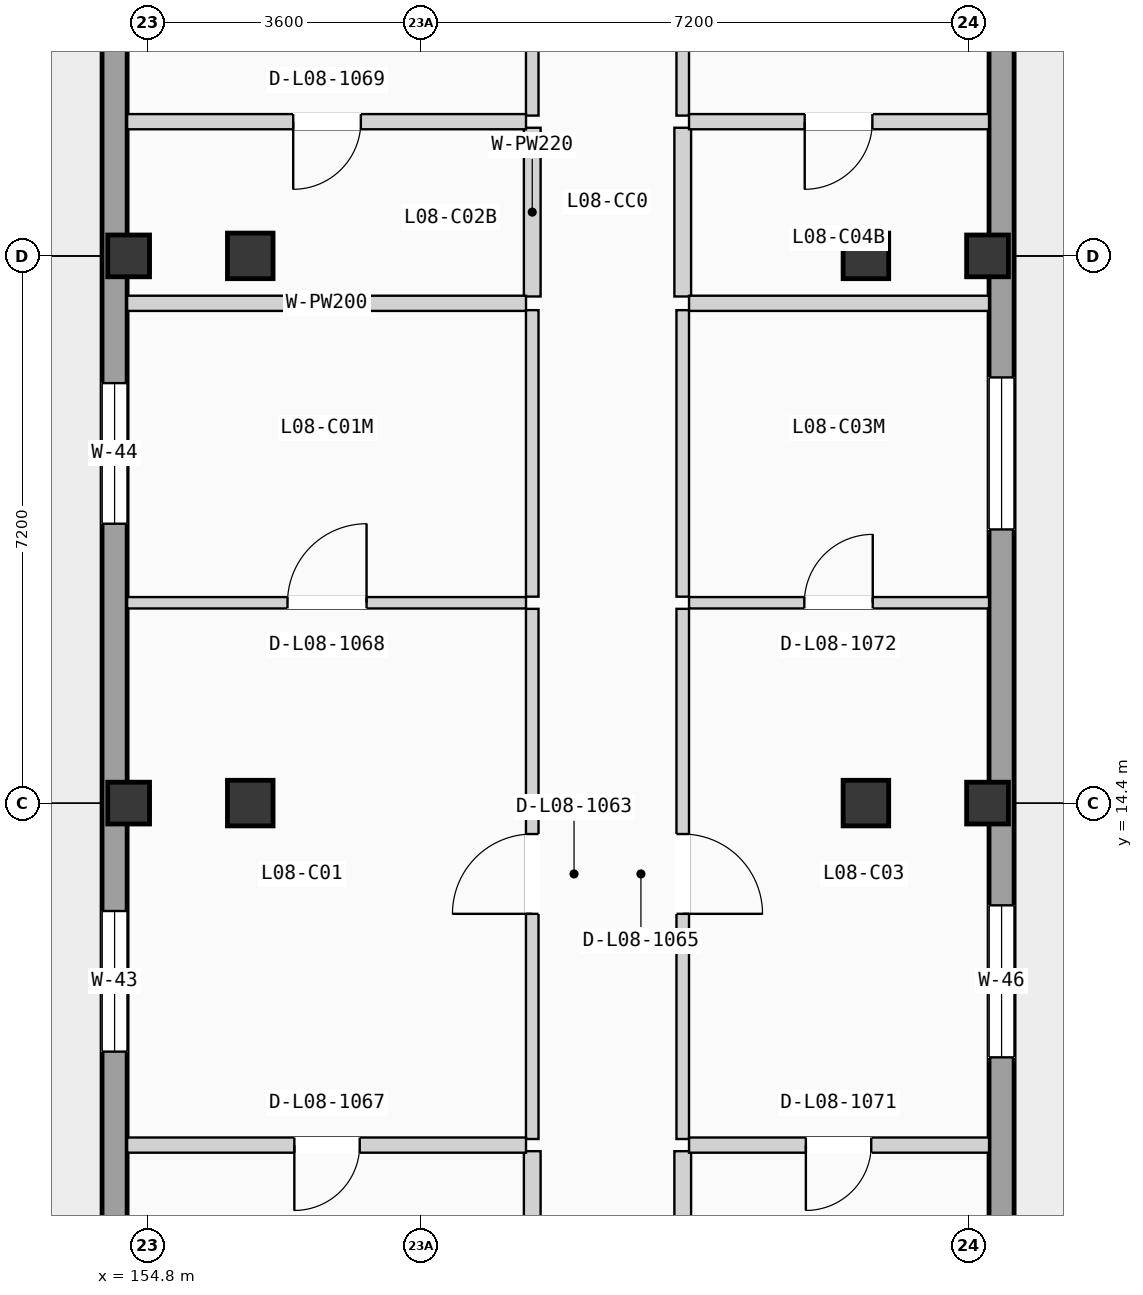
"""IFC4 building model, lengths in metres.
Left out: names, types, materials, properties, quantities, classifications, styles, units other than length and angle.
Written with IfcOpenShell. Run it as: python <this file> out.ifc"""

import sys

from ifc_helpers import new_model, si_unit, direction, frame, frame_2d, origin, origin_2d, place, context, subcontext, project, spatial, rectangle, extrude, element, fill, save


model = new_model("IFC4")
c1 = context("Model", 3, precision=1e-05, world=origin(), true_north=direction((0.0, 1.0)))
c2 = subcontext(c1, "Body", "Model", "MODEL_VIEW")
j1 = project(units=[si_unit("LENGTHUNIT", "METRE"), si_unit("PLANEANGLEUNIT", "RADIAN")], contexts=[c1])
p1 = place(None, origin())
s1 = spatial("IfcSite", under=j1, at=p1, CompositionType="ELEMENT")
p2 = place(p1, origin())
s2 = spatial("IfcBuilding", under=s1, at=p2, CompositionType="ELEMENT")
p3 = place(p2, frame((0.0, 0.0, 27.825)))
s3 = spatial("IfcBuildingStorey", under=s2, at=p3, CompositionType="ELEMENT", Elevation=27.825)
for number, where, z_axis, x_axis in (
    (1, (154.55, 14.4, 0.0), (0.0, 0.0, 1.0), (1.0, 0.0, 0.0)),
    (2, (154.55, 21.6, 0.0), (0.0, 0.0, 1.0), (1.0, 0.0, 0.0)),
):
    element("IfcColumn", number, at=place(p3, frame(where, z_axis=z_axis, x_axis=x_axis)), inside=s3, PredefinedType="COLUMN", context=c2, shape_type="SweptSolid", body=[
        extrude(rectangle(XDim=0.55, YDim=0.55, at=origin_2d()), origin(), (0.0, 0.0, 1.0), 3.15),
    ])
for number, where, z_axis, x_axis in (
    (3, (156.15, 14.4, 0.0), (0.0, 0.0, 1.0), (1.0, 0.0, 0.0)),
    (4, (156.15, 21.6, 0.0), (0.0, 0.0, 1.0), (1.0, 0.0, 0.0)),
    (5, (164.25, 14.4, 0.0), (0.0, 0.0, 1.0), (1.0, 0.0, 0.0)),
    (6, (164.25, 21.6, 0.0), (0.0, 0.0, 1.0), (1.0, 0.0, 0.0)),
):
    element("IfcColumn", number, at=place(p3, frame(where, z_axis=z_axis, x_axis=x_axis)), inside=s3, PredefinedType="COLUMN", context=c2, shape_type="SweptSolid", body=[
        extrude(rectangle(XDim=0.6, YDim=0.6, at=origin_2d()), origin(), (0.0, 0.0, 1.0), 3.15),
    ])
for number, where, z_axis, x_axis in (
    (7, (165.85, 14.4, 0.0), (0.0, 0.0, 1.0), (1.0, 0.0, 0.0)),
    (8, (165.85, 21.6, 0.0), (0.0, 0.0, 1.0), (1.0, 0.0, 0.0)),
):
    element("IfcColumn", number, at=place(p3, frame(where, z_axis=z_axis, x_axis=x_axis)), inside=s3, PredefinedType="COLUMN", context=c2, shape_type="SweptSolid", body=[
        extrude(rectangle(XDim=0.55, YDim=0.55, at=origin_2d()), origin(), (0.0, 0.0, 1.0), 3.15),
    ])
p4 = place(p3, frame((154.365, 0.33, 0.0), z_axis=(0.0, 0.0, 1.0), x_axis=(0.0, 1.0, 0.0)))
e9 = element("IfcWall", 9, at=p4, inside=s3, PredefinedType="SOLIDWALL", context=c2, shape_type="SweptSolid", body=[
    extrude(rectangle(XDim=49.74, YDim=0.33, at=frame_2d((24.87, 0.0))), origin(), (0.0, 0.0, 1.0), 2.89),
])
p5 = place(p4, frame((10.8, 0.0, 0.705)))
e10 = element("IfcOpeningElement", 10, at=p5, cuts=e9, PredefinedType="OPENING", context=c2, shape_type="SweptSolid", body=[
    extrude(rectangle(XDim=1.85, YDim=1.5, at=frame_2d((0.925, 0.75))), frame((0.0, 0.175, 0.0), z_axis=(0.0, -1.0, 0.0), x_axis=(1.0, 0.0, 0.0)), (0.0, 0.0, 1.0), 0.35),
])
p6 = place(p4, frame((17.746, 0.0, 0.555)))
e11 = element("IfcOpeningElement", 11, at=p6, cuts=e9, PredefinedType="OPENING", context=c2, shape_type="SweptSolid", body=[
    extrude(rectangle(XDim=1.85, YDim=1.65, at=frame_2d((0.925, 0.825))), frame((0.0, 0.175, 0.0), z_axis=(0.0, -1.0, 0.0), x_axis=(1.0, 0.0, 0.0)), (0.0, 0.0, 1.0), 0.35),
])
p7 = place(p4, frame((31.595, 0.0, 0.85)))
e12 = element("IfcOpeningElement", 12, at=p7, cuts=e9, PredefinedType="OPENING", context=c2, shape_type="SweptSolid", body=[
    extrude(rectangle(XDim=0.95, YDim=1.2, at=frame_2d((0.475, 0.6))), frame((0.0, 0.175, 0.0), z_axis=(0.0, -1.0, 0.0), x_axis=(1.0, 0.0, 0.0)), (0.0, 0.0, 1.0), 0.35),
])
p8 = place(p3, frame((166.035, 0.33, 0.0), z_axis=(0.0, 0.0, 1.0), x_axis=(0.0, 1.0, 0.0)))
e13 = element("IfcWall", 13, at=p8, inside=s3, PredefinedType="SOLIDWALL", context=c2, shape_type="SweptSolid", body=[
    extrude(rectangle(XDim=49.74, YDim=0.33, at=frame_2d((24.87, 0.0))), origin(), (0.0, 0.0, 1.0), 2.89),
])
p9 = place(p8, frame((10.725, 0.0, 0.9)))
e14 = element("IfcOpeningElement", 14, at=p9, cuts=e13, PredefinedType="OPENING", context=c2, shape_type="SweptSolid", body=[
    extrude(rectangle(XDim=2.0, YDim=1.2, at=frame_2d((1.0, 0.6))), frame((0.0, 0.175, 0.0), z_axis=(0.0, -1.0, 0.0), x_axis=(1.0, 0.0, 0.0)), (0.0, 0.0, 1.0), 0.35),
])
p10 = place(p8, frame((17.671, 0.0, 0.855)))
e15 = element("IfcOpeningElement", 15, at=p10, cuts=e13, PredefinedType="OPENING", context=c2, shape_type="SweptSolid", body=[
    extrude(rectangle(XDim=2.0, YDim=1.35, at=frame_2d((1.0, 0.675))), frame((0.0, 0.175, 0.0), z_axis=(0.0, -1.0, 0.0), x_axis=(1.0, 0.0, 0.0)), (0.0, 0.0, 1.0), 0.35),
])
p11 = place(p8, frame((31.07, 0.0, 0.705)))
e16 = element("IfcOpeningElement", 16, at=p11, cuts=e13, PredefinedType="OPENING", context=c2, shape_type="SweptSolid", body=[
    extrude(rectangle(XDim=2.0, YDim=1.5, at=frame_2d((1.0, 0.75))), frame((0.0, 0.175, 0.0), z_axis=(0.0, -1.0, 0.0), x_axis=(1.0, 0.0, 0.0)), (0.0, 0.0, 1.0), 0.35),
])
p12 = place(p3, frame((159.86, 7.6, 0.0), z_axis=(0.0, 0.0, 1.0), x_axis=(0.0, 1.0, 0.0)))
e17 = element("IfcWall", 17, at=p12, inside=s3, PredefinedType="PLUMBINGWALL", context=c2, shape_type="SweptSolid", body=[
    extrude(rectangle(XDim=2.22, YDim=0.22, at=frame_2d((1.11, 0.0))), origin(), (0.0, 0.0, 1.0), 2.87),
])
p13 = place(p3, frame((159.86, 9.98, 0.0), z_axis=(0.0, 0.0, 1.0), x_axis=(0.0, 1.0, 0.0)))
e18 = element("IfcWall", 18, at=p13, inside=s3, PredefinedType="PARTITIONING", context=c2, shape_type="SweptSolid", body=[
    extrude(rectangle(XDim=6.976, YDim=0.165, at=frame_2d((3.488, 0.0))), origin(), (0.0, 0.0, 1.0), 2.87),
])
p14 = place(p13, frame((2.963, 0.0, 0.0)))
e19 = element("IfcOpeningElement", 19, at=p14, cuts=e18, PredefinedType="OPENING", context=c2, shape_type="SweptSolid", body=[
    extrude(rectangle(XDim=1.05, YDim=2.13, at=frame_2d((0.525, 1.065))), frame((0.0, 0.093, 0.0), z_axis=(0.0, -1.0, 0.0), x_axis=(1.0, 0.0, 0.0)), (0.0, 0.0, 1.0), 0.185),
])
p15 = place(p3, frame((159.86, 17.116, 0.0), z_axis=(0.0, 0.0, 1.0), x_axis=(0.0, 1.0, 0.0)))
e20 = element("IfcWall", 20, at=p15, inside=s3, PredefinedType="PARTITIONING", context=c2, shape_type="SweptSolid", body=[
    extrude(rectangle(XDim=3.77, YDim=0.165, at=frame_2d((1.885, 0.0))), origin(), (0.0, 0.0, 1.0), 2.87),
])
p16 = place(p3, frame((159.86, 21.066, 0.0), z_axis=(0.0, 0.0, 1.0), x_axis=(0.0, 1.0, 0.0)))
e21 = element("IfcWall", 21, at=p16, inside=s3, PredefinedType="PLUMBINGWALL", context=c2, shape_type="SweptSolid", body=[
    extrude(rectangle(XDim=2.22, YDim=0.22, at=frame_2d((1.11, 0.0))), origin(), (0.0, 0.0, 1.0), 2.87),
])
p17 = place(p3, frame((159.86, 23.446, 0.0), z_axis=(0.0, 0.0, 1.0), x_axis=(0.0, 1.0, 0.0)))
e22 = element("IfcWall", 22, at=p17, inside=s3, PredefinedType="PARTITIONING", context=c2, shape_type="SweptSolid", body=[
    extrude(rectangle(XDim=15.424, YDim=0.165, at=frame_2d((7.712, 0.0))), origin(), (0.0, 0.0, 1.0), 2.87),
])
p18 = place(p17, frame((7.187, 0.0, 0.0)))
e23 = element("IfcOpeningElement", 23, at=p18, cuts=e22, PredefinedType="OPENING", context=c2, shape_type="SweptSolid", body=[
    extrude(rectangle(XDim=1.05, YDim=2.13, at=frame_2d((0.525, 1.065))), frame((0.0, 0.093, 0.0), z_axis=(0.0, -1.0, 0.0), x_axis=(1.0, 0.0, 0.0)), (0.0, 0.0, 1.0), 0.185),
])
p19 = place(p3, frame((161.84, 7.575, 0.0), z_axis=(0.0, 0.0, 1.0), x_axis=(0.0, 1.0, 0.0)))
e24 = element("IfcWall", 24, at=p19, inside=s3, PredefinedType="PLUMBINGWALL", context=c2, shape_type="SweptSolid", body=[
    extrude(rectangle(XDim=2.245, YDim=0.22, at=frame_2d((1.123, 0.0))), origin(), (0.0, 0.0, 1.0), 2.87),
])
p20 = place(p3, frame((161.84, 9.98, 0.0), z_axis=(0.0, 0.0, 1.0), x_axis=(0.0, 1.0, 0.0)))
e25 = element("IfcWall", 25, at=p20, inside=s3, PredefinedType="PARTITIONING", context=c2, shape_type="SweptSolid", body=[
    extrude(rectangle(XDim=6.976, YDim=0.165, at=frame_2d((3.488, 0.0))), origin(), (0.0, 0.0, 1.0), 2.87),
])
p21 = place(p20, frame((2.963, 0.0, 0.0)))
e26 = element("IfcOpeningElement", 26, at=p21, cuts=e25, PredefinedType="OPENING", context=c2, shape_type="SweptSolid", body=[
    extrude(rectangle(XDim=1.05, YDim=2.13, at=frame_2d((0.525, 1.065))), frame((0.0, 0.093, 0.0), z_axis=(0.0, -1.0, 0.0), x_axis=(1.0, 0.0, 0.0)), (0.0, 0.0, 1.0), 0.185),
])
p22 = place(p3, frame((161.84, 17.116, 0.0), z_axis=(0.0, 0.0, 1.0), x_axis=(0.0, 1.0, 0.0)))
e27 = element("IfcWall", 27, at=p22, inside=s3, PredefinedType="PARTITIONING", context=c2, shape_type="SweptSolid", body=[
    extrude(rectangle(XDim=3.77, YDim=0.165, at=frame_2d((1.885, 0.0))), origin(), (0.0, 0.0, 1.0), 2.87),
])
p23 = place(p3, frame((161.84, 21.066, 0.0), z_axis=(0.0, 0.0, 1.0), x_axis=(0.0, 1.0, 0.0)))
e28 = element("IfcWall", 28, at=p23, inside=s3, PredefinedType="PLUMBINGWALL", context=c2, shape_type="SweptSolid", body=[
    extrude(rectangle(XDim=2.22, YDim=0.22, at=frame_2d((1.11, 0.0))), origin(), (0.0, 0.0, 1.0), 2.87),
])
p24 = place(p3, frame((161.84, 23.446, 0.0), z_axis=(0.0, 0.0, 1.0), x_axis=(0.0, 1.0, 0.0)))
e29 = element("IfcWall", 29, at=p24, inside=s3, PredefinedType="PARTITIONING", context=c2, shape_type="SweptSolid", body=[
    extrude(rectangle(XDim=15.424, YDim=0.165, at=frame_2d((7.712, 0.0))), origin(), (0.0, 0.0, 1.0), 2.87),
])
p25 = place(p24, frame((7.187, 0.0, 0.0)))
e30 = element("IfcOpeningElement", 30, at=p25, cuts=e29, PredefinedType="OPENING", context=c2, shape_type="SweptSolid", body=[
    extrude(rectangle(XDim=1.05, YDim=2.13, at=frame_2d((0.525, 1.065))), frame((0.0, 0.093, 0.0), z_axis=(0.0, -1.0, 0.0), x_axis=(1.0, 0.0, 0.0)), (0.0, 0.0, 1.0), 0.185),
])
p26 = place(p3, frame((154.53, 9.9, 0.0), z_axis=(0.0, 0.0, 1.0), x_axis=(1.0, 0.0, 0.0)))
e31 = element("IfcWall", 31, at=p26, inside=s3, PredefinedType="PLUMBINGWALL", context=c2, shape_type="SweptSolid", body=[
    extrude(rectangle(XDim=5.248, YDim=0.2, at=frame_2d((2.624, 0.0))), origin(), (0.0, 0.0, 1.0), 2.87),
])
p27 = place(p26, frame((2.2, 0.0, 0.0)))
e32 = element("IfcOpeningElement", 32, at=p27, cuts=e31, PredefinedType="OPENING", context=c2, shape_type="SweptSolid", body=[
    extrude(rectangle(XDim=0.86, YDim=2.0, at=frame_2d((0.43, 1.0))), frame((0.0, 0.11, 0.0), z_axis=(0.0, -1.0, 0.0), x_axis=(1.0, 0.0, 0.0)), (0.0, 0.0, 1.0), 0.22),
])
p28 = place(p3, frame((154.53, 17.036, 0.0), z_axis=(0.0, 0.0, 1.0), x_axis=(1.0, 0.0, 0.0)))
e33 = element("IfcWall", 33, at=p28, inside=s3, PredefinedType="PARTITIONING", context=c2, shape_type="SweptSolid", body=[
    extrude(rectangle(XDim=5.248, YDim=0.15, at=frame_2d((2.624, 0.0))), origin(), (0.0, 0.0, 1.0), 2.87),
])
p29 = place(p28, frame((2.11, 0.0, 0.0)))
e34 = element("IfcOpeningElement", 34, at=p29, cuts=e33, PredefinedType="OPENING", context=c2, shape_type="SweptSolid", body=[
    extrude(rectangle(XDim=1.04, YDim=2.08, at=frame_2d((0.52, 1.04))), frame((0.0, 0.085, 0.0), z_axis=(0.0, -1.0, 0.0), x_axis=(1.0, 0.0, 0.0)), (0.0, 0.0, 1.0), 0.17),
])
p30 = place(p3, frame((154.53, 20.976, 0.0), z_axis=(0.0, 0.0, 1.0), x_axis=(1.0, 0.0, 0.0)))
e35 = element("IfcWall", 35, at=p30, inside=s3, PredefinedType="PLUMBINGWALL", context=c2, shape_type="SweptSolid", body=[
    extrude(rectangle(XDim=5.248, YDim=0.2, at=frame_2d((2.624, 0.0))), origin(), (0.0, 0.0, 1.0), 2.87),
])
p31 = place(p3, frame((154.53, 23.366, 0.0), z_axis=(0.0, 0.0, 1.0), x_axis=(1.0, 0.0, 0.0)))
e36 = element("IfcWall", 36, at=p31, inside=s3, PredefinedType="PLUMBINGWALL", context=c2, shape_type="SweptSolid", body=[
    extrude(rectangle(XDim=5.248, YDim=0.2, at=frame_2d((2.624, 0.0))), origin(), (0.0, 0.0, 1.0), 2.87),
])
p32 = place(p31, frame((2.185, 0.0, 0.0)))
e37 = element("IfcOpeningElement", 37, at=p32, cuts=e36, PredefinedType="OPENING", context=c2, shape_type="SweptSolid", body=[
    extrude(rectangle(XDim=0.89, YDim=2.03, at=frame_2d((0.445, 1.015))), frame((0.0, 0.11, 0.0), z_axis=(0.0, -1.0, 0.0), x_axis=(1.0, 0.0, 0.0)), (0.0, 0.0, 1.0), 0.22),
])
p33 = place(p3, frame((161.923, 9.9, 0.0), z_axis=(0.0, 0.0, 1.0), x_axis=(1.0, 0.0, 0.0)))
e38 = element("IfcWall", 38, at=p33, inside=s3, PredefinedType="PLUMBINGWALL", context=c2, shape_type="SweptSolid", body=[
    extrude(rectangle(XDim=3.947, YDim=0.2, at=frame_2d((1.974, 0.0))), origin(), (0.0, 0.0, 1.0), 2.87),
])
p34 = place(p33, frame((1.537, 0.0, 0.0)))
e39 = element("IfcOpeningElement", 39, at=p34, cuts=e38, PredefinedType="OPENING", context=c2, shape_type="SweptSolid", body=[
    extrude(rectangle(XDim=0.86, YDim=2.0, at=frame_2d((0.43, 1.0))), frame((0.0, 0.11, 0.0), z_axis=(0.0, -1.0, 0.0), x_axis=(1.0, 0.0, 0.0)), (0.0, 0.0, 1.0), 0.22),
])
p35 = place(p3, frame((161.923, 17.036, 0.0), z_axis=(0.0, 0.0, 1.0), x_axis=(1.0, 0.0, 0.0)))
e40 = element("IfcWall", 40, at=p35, inside=s3, PredefinedType="PARTITIONING", context=c2, shape_type="SweptSolid", body=[
    extrude(rectangle(XDim=3.947, YDim=0.15, at=frame_2d((1.974, 0.0))), origin(), (0.0, 0.0, 1.0), 2.87),
])
p36 = place(p35, frame((1.517, 0.0, 0.0)))
e41 = element("IfcOpeningElement", 41, at=p36, cuts=e40, PredefinedType="OPENING", context=c2, shape_type="SweptSolid", body=[
    extrude(rectangle(XDim=0.9, YDim=2.04, at=frame_2d((0.45, 1.02))), frame((0.0, 0.085, 0.0), z_axis=(0.0, -1.0, 0.0), x_axis=(1.0, 0.0, 0.0)), (0.0, 0.0, 1.0), 0.17),
])
p37 = place(p3, frame((161.923, 20.976, 0.0), z_axis=(0.0, 0.0, 1.0), x_axis=(1.0, 0.0, 0.0)))
e42 = element("IfcWall", 42, at=p37, inside=s3, PredefinedType="PLUMBINGWALL", context=c2, shape_type="SweptSolid", body=[
    extrude(rectangle(XDim=3.947, YDim=0.2, at=frame_2d((1.974, 0.0))), origin(), (0.0, 0.0, 1.0), 2.87),
])
p38 = place(p3, frame((161.923, 23.366, 0.0), z_axis=(0.0, 0.0, 1.0), x_axis=(1.0, 0.0, 0.0)))
e43 = element("IfcWall", 43, at=p38, inside=s3, PredefinedType="PLUMBINGWALL", context=c2, shape_type="SweptSolid", body=[
    extrude(rectangle(XDim=3.947, YDim=0.2, at=frame_2d((1.974, 0.0))), origin(), (0.0, 0.0, 1.0), 2.87),
])
p39 = place(p38, frame((1.522, 0.0, 0.0)))
e44 = element("IfcOpeningElement", 44, at=p39, cuts=e43, PredefinedType="OPENING", context=c2, shape_type="SweptSolid", body=[
    extrude(rectangle(XDim=0.89, YDim=2.03, at=frame_2d((0.445, 1.015))), frame((0.0, 0.11, 0.0), z_axis=(0.0, -1.0, 0.0), x_axis=(1.0, 0.0, 0.0)), (0.0, 0.0, 1.0), 0.22),
])
p40 = place(p5, origin())
e45 = element("IfcWindow", 45, at=p40, inside=s3, PartitioningType="DOUBLE_PANEL_VERTICAL", PredefinedType="WINDOW", context=c2, shape_type="SweptSolid", body=[
    extrude(rectangle(XDim=1.85, YDim=1.5, at=frame_2d((0.925, 0.75))), frame((0.0, 0.03, 0.0), z_axis=(0.0, -1.0, 0.0), x_axis=(1.0, 0.0, 0.0)), (0.0, 0.0, 1.0), 0.06),
])
fill(e10, e45)
p41 = place(p6, origin())
e46 = element("IfcWindow", 46, at=p41, inside=s3, PartitioningType="DOUBLE_PANEL_VERTICAL", PredefinedType="WINDOW", context=c2, shape_type="SweptSolid", body=[
    extrude(rectangle(XDim=1.85, YDim=1.65, at=frame_2d((0.925, 0.825))), frame((0.0, 0.03, 0.0), z_axis=(0.0, -1.0, 0.0), x_axis=(1.0, 0.0, 0.0)), (0.0, 0.0, 1.0), 0.06),
])
fill(e11, e46)
p42 = place(p9, origin())
e47 = element("IfcWindow", 47, at=p42, inside=s3, PartitioningType="DOUBLE_PANEL_VERTICAL", PredefinedType="WINDOW", context=c2, shape_type="SweptSolid", body=[
    extrude(rectangle(XDim=2.0, YDim=1.2, at=frame_2d((1.0, 0.6))), frame((0.0, 0.03, 0.0), z_axis=(0.0, -1.0, 0.0), x_axis=(1.0, 0.0, 0.0)), (0.0, 0.0, 1.0), 0.06),
])
fill(e14, e47)
p43 = place(p10, origin())
e48 = element("IfcWindow", 48, at=p43, inside=s3, PartitioningType="DOUBLE_PANEL_VERTICAL", PredefinedType="WINDOW", context=c2, shape_type="SweptSolid", body=[
    extrude(rectangle(XDim=2.0, YDim=1.35, at=frame_2d((1.0, 0.675))), frame((0.0, 0.03, 0.0), z_axis=(0.0, -1.0, 0.0), x_axis=(1.0, 0.0, 0.0)), (0.0, 0.0, 1.0), 0.06),
])
fill(e15, e48)
p44 = place(p14, origin())
e49 = element("IfcDoor", 49, at=p44, inside=s3, OperationType="SINGLE_SWING_LEFT", PredefinedType="DOOR", context=c2, shape_type="SweptSolid", body=[
    extrude(rectangle(XDim=1.05, YDim=2.13, at=frame_2d((0.525, 1.065))), frame((0.0, 0.025, 0.0), z_axis=(0.0, -1.0, 0.0), x_axis=(1.0, 0.0, 0.0)), (0.0, 0.0, 1.0), 0.05),
])
fill(e19, e49)
p45 = place(p21, frame((1.05, 0.0, 0.0), z_axis=(0.0, 0.0, 1.0), x_axis=(-1.0, 0.0, 0.0)))
e50 = element("IfcDoor", 50, at=p45, inside=s3, OperationType="SINGLE_SWING_LEFT", PredefinedType="DOOR", context=c2, shape_type="SweptSolid", body=[
    extrude(rectangle(XDim=1.05, YDim=2.13, at=frame_2d((0.525, 1.065))), frame((0.0, 0.025, 0.0), z_axis=(0.0, -1.0, 0.0), x_axis=(1.0, 0.0, 0.0)), (0.0, 0.0, 1.0), 0.05),
])
fill(e26, e50)
p46 = place(p27, frame((0.86, 0.0, 0.0), z_axis=(0.0, 0.0, 1.0), x_axis=(-1.0, 0.0, 0.0)))
e51 = element("IfcDoor", 51, at=p46, inside=s3, OperationType="SINGLE_SWING_LEFT", PredefinedType="DOOR", context=c2, shape_type="SweptSolid", body=[
    extrude(rectangle(XDim=0.86, YDim=2.0, at=frame_2d((0.43, 1.0))), frame((0.0, 0.025, 0.0), z_axis=(0.0, -1.0, 0.0), x_axis=(1.0, 0.0, 0.0)), (0.0, 0.0, 1.0), 0.05),
])
fill(e32, e51)
p47 = place(p29, origin())
e52 = element("IfcDoor", 52, at=p47, inside=s3, OperationType="SINGLE_SWING_RIGHT", PredefinedType="DOOR", context=c2, shape_type="SweptSolid", body=[
    extrude(rectangle(XDim=1.04, YDim=2.08, at=frame_2d((0.52, 1.04))), frame((0.0, 0.025, 0.0), z_axis=(0.0, -1.0, 0.0), x_axis=(1.0, 0.0, 0.0)), (0.0, 0.0, 1.0), 0.05),
])
fill(e34, e52)
p48 = place(p32, frame((0.89, 0.0, 0.0), z_axis=(0.0, 0.0, 1.0), x_axis=(-1.0, 0.0, 0.0)))
e53 = element("IfcDoor", 53, at=p48, inside=s3, OperationType="SINGLE_SWING_LEFT", PredefinedType="DOOR", context=c2, shape_type="SweptSolid", body=[
    extrude(rectangle(XDim=0.89, YDim=2.03, at=frame_2d((0.445, 1.015))), frame((0.0, 0.025, 0.0), z_axis=(0.0, -1.0, 0.0), x_axis=(1.0, 0.0, 0.0)), (0.0, 0.0, 1.0), 0.05),
])
fill(e37, e53)
p49 = place(p34, frame((0.86, 0.0, 0.0), z_axis=(0.0, 0.0, 1.0), x_axis=(-1.0, 0.0, 0.0)))
e54 = element("IfcDoor", 54, at=p49, inside=s3, OperationType="SINGLE_SWING_LEFT", PredefinedType="DOOR", context=c2, shape_type="SweptSolid", body=[
    extrude(rectangle(XDim=0.86, YDim=2.0, at=frame_2d((0.43, 1.0))), frame((0.0, 0.025, 0.0), z_axis=(0.0, -1.0, 0.0), x_axis=(1.0, 0.0, 0.0)), (0.0, 0.0, 1.0), 0.05),
])
fill(e39, e54)
p50 = place(p36, origin())
e55 = element("IfcDoor", 55, at=p50, inside=s3, OperationType="SINGLE_SWING_RIGHT", PredefinedType="DOOR", context=c2, shape_type="SweptSolid", body=[
    extrude(rectangle(XDim=0.9, YDim=2.04, at=frame_2d((0.45, 1.02))), frame((0.0, 0.025, 0.0), z_axis=(0.0, -1.0, 0.0), x_axis=(1.0, 0.0, 0.0)), (0.0, 0.0, 1.0), 0.05),
])
fill(e41, e55)
p51 = place(p39, frame((0.89, 0.0, 0.0), z_axis=(0.0, 0.0, 1.0), x_axis=(-1.0, 0.0, 0.0)))
e56 = element("IfcDoor", 56, at=p51, inside=s3, OperationType="SINGLE_SWING_LEFT", PredefinedType="DOOR", context=c2, shape_type="SweptSolid", body=[
    extrude(rectangle(XDim=0.89, YDim=2.03, at=frame_2d((0.445, 1.015))), frame((0.0, 0.025, 0.0), z_axis=(0.0, -1.0, 0.0), x_axis=(1.0, 0.0, 0.0)), (0.0, 0.0, 1.0), 0.05),
])
fill(e44, e56)
save(model, sys.argv[1])
